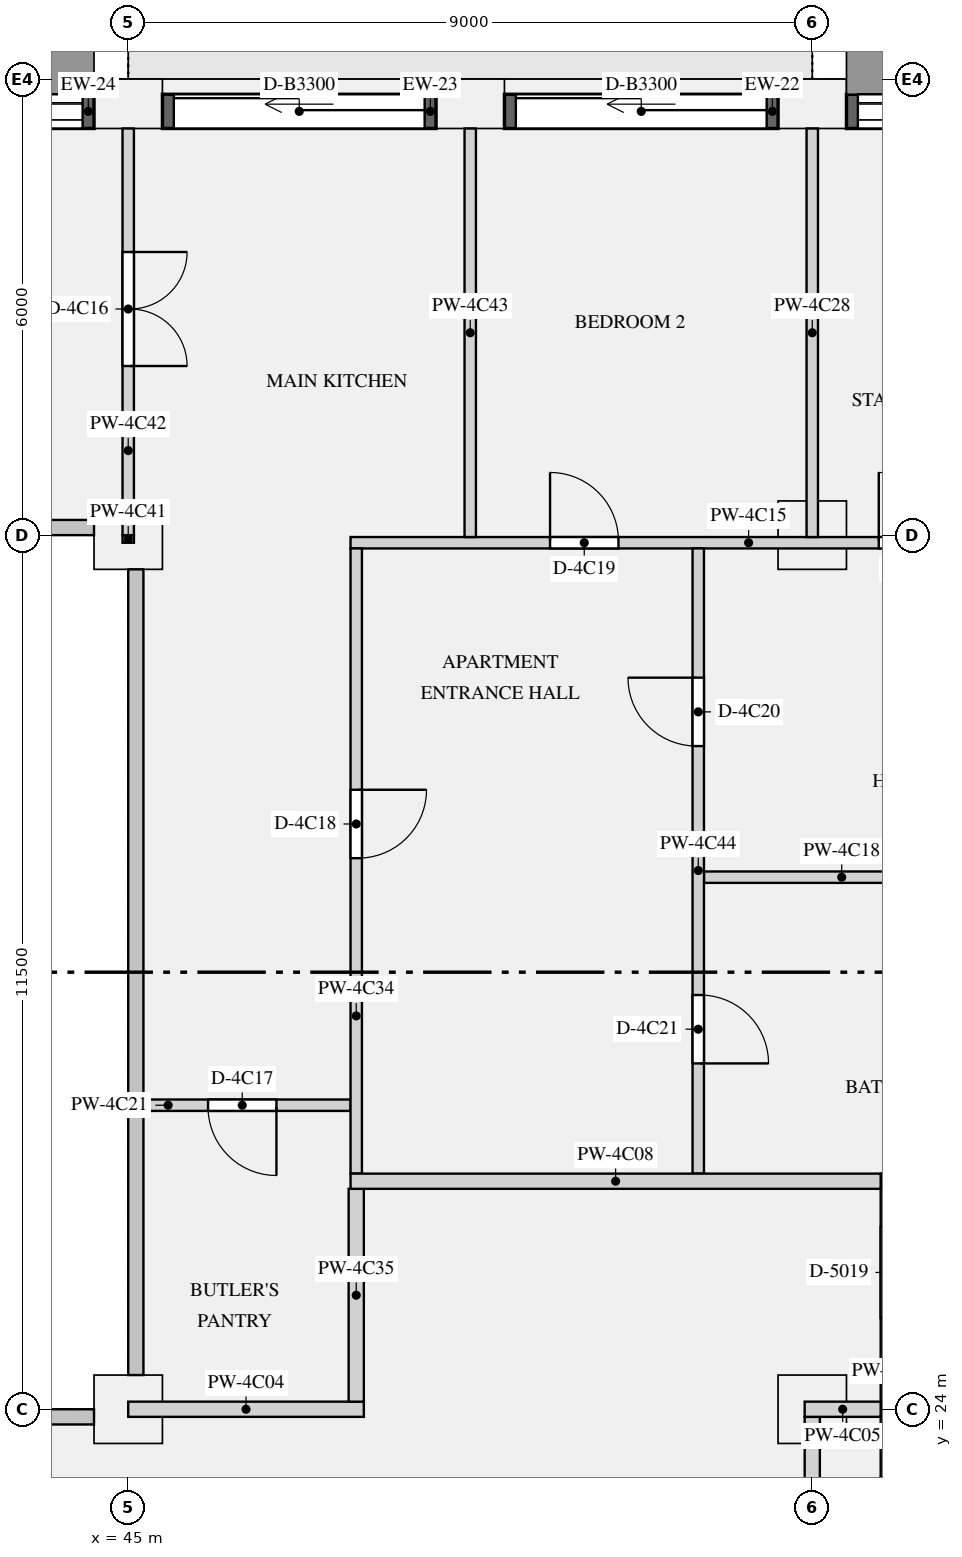
"""IFC4 building model, lengths in metres.
Left out: names, types, materials, properties, quantities, classifications, styles, units other than length and angle.
Written with IfcOpenShell. Run it as: python <this file> out.ifc"""

import sys

from ifc_helpers import new_model, si_unit, direction, frame, frame_2d, origin, origin_2d, place, context, subcontext, project, spatial, rectangle, extrude, element, fill, save


model = new_model("IFC4")
c1 = context("Model", 3, precision=1e-05, world=origin(), true_north=direction((0.0, 1.0)))
c2 = subcontext(c1, "Body", "Model", "MODEL_VIEW")
j1 = project(units=[si_unit("LENGTHUNIT", "METRE"), si_unit("PLANEANGLEUNIT", "RADIAN")], contexts=[c1])
p1 = place(None, origin())
s1 = spatial("IfcSite", under=j1, at=p1, CompositionType="ELEMENT")
p2 = place(p1, origin())
s2 = spatial("IfcBuilding", under=s1, at=p2, CompositionType="ELEMENT")
p3 = place(p2, frame((0.0, 0.0, 216.9)))
s3 = spatial("IfcBuildingStorey", under=s2, at=p3, CompositionType="ELEMENT", Elevation=216.9)
for number, where, z_axis, x_axis in (
    (1, (54.0, 41.175, 0.0), (0.0, 0.0, 1.0), (-1.0, 0.0, 0.0)),
    (2, (49.5, 41.175, 0.0), (0.0, 0.0, 1.0), (-1.0, 0.0, 0.0)),
    (3, (45.0, 41.175, 0.0), (0.0, 0.0, 1.0), (-1.0, 0.0, 0.0)),
):
    element("IfcColumn", number, at=place(p3, frame(where, z_axis=z_axis, x_axis=x_axis)), inside=s3, PredefinedType="USERDEFINED", context=c2, shape_type="SweptSolid", body=[
        extrude(rectangle(XDim=0.9, YDim=0.65, at=origin_2d()), origin(), (0.0, 0.0, 1.0), 3.15),
    ])
for number, where, z_axis, x_axis in (
    (4, (45.0, 24.0, 0.0), (0.0, 0.0, 1.0), (1.0, 0.0, 0.0)),
    (5, (54.0, 24.0, 0.0), (0.0, 0.0, 1.0), (1.0, 0.0, 0.0)),
    (6, (45.0, 35.5, 0.0), (0.0, 0.0, 1.0), (1.0, 0.0, 0.0)),
    (7, (54.0, 35.5, 0.0), (0.0, 0.0, 1.0), (1.0, 0.0, 0.0)),
):
    element("IfcColumn", number, at=place(p3, frame(where, z_axis=z_axis, x_axis=x_axis)), inside=s3, PredefinedType="COLUMN", context=c2, shape_type="SweptSolid", body=[
        extrude(rectangle(XDim=0.9, YDim=0.9, at=origin_2d()), origin(), (0.0, 0.0, 1.0), 3.15),
    ])
p4 = place(p3, frame((58.05, 41.075, 0.9), z_axis=(0.0, 0.0, 1.0), x_axis=(-1.0, 0.0, 0.0)))
e8 = element("IfcWall", 8, at=p4, inside=s3, PredefinedType="SOLIDWALL", context=c2, shape_type="SweptSolid", body=[
    extrude(rectangle(XDim=3.6, YDim=0.45, at=frame_2d((1.8, 0.0))), origin(), (0.0, 0.0, 1.0), 1.93),
])
p5 = place(p4, frame((0.15, 0.0, 0.15)))
e9 = element("IfcOpeningElement", 9, at=p5, cuts=e8, PredefinedType="OPENING", context=c2, shape_type="SweptSolid", body=[
    extrude(rectangle(XDim=3.3, YDim=1.5, at=frame_2d((1.65, 0.75))), frame((0.0, 0.235, 0.0), z_axis=(0.0, -1.0, 0.0), x_axis=(1.0, 0.0, 0.0)), (0.0, 0.0, 1.0), 0.47),
])
p6 = place(p3, frame((53.55, 41.075, 0.0), z_axis=(0.0, 0.0, 1.0), x_axis=(-1.0, 0.0, 0.0)))
e10 = element("IfcWall", 10, at=p6, inside=s3, PredefinedType="SOLIDWALL", context=c2, shape_type="SweptSolid", body=[
    extrude(rectangle(XDim=3.6, YDim=0.45, at=frame_2d((1.8, 0.0))), origin(), (0.0, 0.0, 1.0), 2.83),
])
p7 = place(p6, frame((0.15, 0.0, 0.0)))
e11 = element("IfcOpeningElement", 11, at=p7, cuts=e10, PredefinedType="OPENING", context=c2, shape_type="SweptSolid", body=[
    extrude(rectangle(XDim=3.3, YDim=2.3, at=frame_2d((1.65, 1.15))), frame((0.0, 0.235, 0.0), z_axis=(0.0, -1.0, 0.0), x_axis=(1.0, 0.0, 0.0)), (0.0, 0.0, 1.0), 0.47),
])
p8 = place(p3, frame((49.05, 41.075, 0.0), z_axis=(0.0, 0.0, 1.0), x_axis=(-1.0, 0.0, 0.0)))
e12 = element("IfcWall", 12, at=p8, inside=s3, PredefinedType="SOLIDWALL", context=c2, shape_type="SweptSolid", body=[
    extrude(rectangle(XDim=3.6, YDim=0.45, at=frame_2d((1.8, 0.0))), origin(), (0.0, 0.0, 1.0), 2.83),
])
p9 = place(p8, frame((0.15, 0.0, 0.0)))
e13 = element("IfcOpeningElement", 13, at=p9, cuts=e12, PredefinedType="OPENING", context=c2, shape_type="SweptSolid", body=[
    extrude(rectangle(XDim=3.3, YDim=2.3, at=frame_2d((1.65, 1.15))), frame((0.0, 0.235, 0.0), z_axis=(0.0, -1.0, 0.0), x_axis=(1.0, 0.0, 0.0)), (0.0, 0.0, 1.0), 0.47),
])
p10 = place(p3, frame((44.55, 41.075, 0.9), z_axis=(0.0, 0.0, 1.0), x_axis=(-1.0, 0.0, 0.0)))
e14 = element("IfcWall", 14, at=p10, inside=s3, PredefinedType="SOLIDWALL", context=c2, shape_type="SweptSolid", body=[
    extrude(rectangle(XDim=3.6, YDim=0.45, at=frame_2d((1.8, 0.0))), origin(), (0.0, 0.0, 1.0), 1.93),
])
p11 = place(p10, frame((0.15, 0.0, 0.15)))
e15 = element("IfcOpeningElement", 15, at=p11, cuts=e14, PredefinedType="OPENING", context=c2, shape_type="SweptSolid", body=[
    extrude(rectangle(XDim=3.3, YDim=1.5, at=frame_2d((1.65, 0.75))), frame((0.0, 0.235, 0.0), z_axis=(0.0, -1.0, 0.0), x_axis=(1.0, 0.0, 0.0)), (0.0, 0.0, 1.0), 0.47),
])
p12 = place(p3, frame((54.9, 27.0, 0.0), z_axis=(0.0, 0.0, 1.0), x_axis=(1.0, 0.0, 0.0)))
e16 = element("IfcWall", 16, at=p12, inside=s3, PredefinedType="PARTITIONING", context=c2, shape_type="SweptSolid", body=[
    extrude(rectangle(XDim=1.3, YDim=0.2, at=frame_2d((0.65, 0.0))), origin(), (0.0, 0.0, 1.0), 2.83),
])
p13 = place(p3, frame((55.0, 23.1, 0.0), z_axis=(0.0, 0.0, 1.0), x_axis=(0.0, 1.0, 0.0)))
e17 = element("IfcWall", 17, at=p13, inside=s3, PredefinedType="PARTITIONING", context=c2, shape_type="SweptSolid", body=[
    extrude(rectangle(XDim=3.8, YDim=0.2, at=frame_2d((1.9, 0.0))), origin(), (0.0, 0.0, 1.0), 2.83),
])
p14 = place(p13, frame((2.1, 0.0, 0.0)))
e18 = element("IfcOpeningElement", 18, at=p14, cuts=e17, PredefinedType="OPENING", context=c2, shape_type="SweptSolid", body=[
    extrude(rectangle(XDim=1.2, YDim=2.1, at=frame_2d((0.6, 1.05))), frame((0.0, 0.11, 0.0), z_axis=(0.0, -1.0, 0.0), x_axis=(1.0, 0.0, 0.0)), (0.0, 0.0, 1.0), 0.22),
])
p15 = place(p3, frame((45.0, 24.0, 0.0), z_axis=(0.0, 0.0, 1.0), x_axis=(1.0, 0.0, 0.0)))
e19 = element("IfcWall", 19, at=p15, inside=s3, PredefinedType="PARTITIONING", context=c2, shape_type="SweptSolid", body=[
    extrude(rectangle(XDim=3.1, YDim=0.2, at=frame_2d((1.55, 0.0))), origin(), (0.0, 0.0, 1.0), 2.83),
])
p16 = place(p3, frame((53.9, 24.0, 0.0), z_axis=(0.0, 0.0, 1.0), x_axis=(1.0, 0.0, 0.0)))
e20 = element("IfcWall", 20, at=p16, inside=s3, PredefinedType="PARTITIONING", context=c2, shape_type="SweptSolid", body=[
    extrude(rectangle(XDim=1.0, YDim=0.2, at=frame_2d((0.5, 0.0))), origin(), (0.0, 0.0, 1.0), 2.83),
])
p17 = place(p3, frame((47.925, 27.0, 0.0), z_axis=(0.0, 0.0, 1.0), x_axis=(1.0, 0.0, 0.0)))
e21 = element("IfcWall", 21, at=p17, inside=s3, PredefinedType="PARTITIONING", context=c2, shape_type="SweptSolid", body=[
    extrude(rectangle(XDim=6.975, YDim=0.2, at=frame_2d((3.487, 0.0))), origin(), (0.0, 0.0, 1.0), 2.83),
])
p18 = place(p3, frame((47.925, 35.4, 0.0), z_axis=(0.0, 0.0, 1.0), x_axis=(1.0, 0.0, 0.0)))
e22 = element("IfcWall", 22, at=p18, inside=s3, PredefinedType="PARTITIONING", context=c2, shape_type="SweptSolid", body=[
    extrude(rectangle(XDim=8.275, YDim=0.15, at=frame_2d((4.137, 0.0))), origin(), (0.0, 0.0, 1.0), 2.83),
])
p19 = place(p18, frame((2.625, 0.0, 0.0)))
e23 = element("IfcOpeningElement", 23, at=p19, cuts=e22, PredefinedType="OPENING", context=c2, shape_type="SweptSolid", body=[
    extrude(rectangle(XDim=0.9, YDim=2.1, at=frame_2d((0.45, 1.05))), frame((0.0, 0.085, 0.0), z_axis=(0.0, -1.0, 0.0), x_axis=(1.0, 0.0, 0.0)), (0.0, 0.0, 1.0), 0.17),
])
p20 = place(p18, frame((6.95, 0.0, 0.0)))
e24 = element("IfcOpeningElement", 24, at=p20, cuts=e22, PredefinedType="OPENING", context=c2, shape_type="SweptSolid", body=[
    extrude(rectangle(XDim=0.9, YDim=2.1, at=frame_2d((0.45, 1.05))), frame((0.0, 0.085, 0.0), z_axis=(0.0, -1.0, 0.0), x_axis=(1.0, 0.0, 0.0)), (0.0, 0.0, 1.0), 0.17),
])
p21 = place(p3, frame((52.575, 31.0, 0.0), z_axis=(0.0, 0.0, 1.0), x_axis=(1.0, 0.0, 0.0)))
e25 = element("IfcWall", 25, at=p21, inside=s3, PredefinedType="PARTITIONING", context=c2, shape_type="SweptSolid", body=[
    extrude(rectangle(XDim=3.625, YDim=0.15, at=frame_2d((1.812, 0.0))), origin(), (0.0, 0.0, 1.0), 2.83),
])
p22 = place(p3, frame((45.0, 28.0, 0.0), z_axis=(0.0, 0.0, 1.0), x_axis=(1.0, 0.0, 0.0)))
e26 = element("IfcWall", 26, at=p22, inside=s3, PredefinedType="PARTITIONING", context=c2, shape_type="SweptSolid", body=[
    extrude(rectangle(XDim=2.925, YDim=0.15, at=frame_2d((1.462, 0.0))), origin(), (0.0, 0.0, 1.0), 2.83),
])
p23 = place(p22, frame((1.05, 0.0, 0.0)))
e27 = element("IfcOpeningElement", 27, at=p23, cuts=e26, PredefinedType="OPENING", context=c2, shape_type="SweptSolid", body=[
    extrude(rectangle(XDim=0.9, YDim=2.1, at=frame_2d((0.45, 1.05))), frame((0.0, 0.085, 0.0), z_axis=(0.0, -1.0, 0.0), x_axis=(1.0, 0.0, 0.0)), (0.0, 0.0, 1.0), 0.17),
])
p24 = place(p3, frame((54.0, 35.475, 0.0), z_axis=(0.0, 0.0, 1.0), x_axis=(0.0, 1.0, 0.0)))
e28 = element("IfcWall", 28, at=p24, inside=s3, PredefinedType="PARTITIONING", context=c2, shape_type="SweptSolid", body=[
    extrude(rectangle(XDim=5.375, YDim=0.15, at=frame_2d((2.688, 0.0))), origin(), (0.0, 0.0, 1.0), 2.83),
])
p25 = place(p3, frame((54.0, 16.1, 0.0), z_axis=(0.0, 0.0, 1.0), x_axis=(0.0, 1.0, 0.0)))
e29 = element("IfcWall", 29, at=p25, inside=s3, PredefinedType="PARTITIONING", context=c2, shape_type="SweptSolid", body=[
    extrude(rectangle(XDim=7.8, YDim=0.2, at=frame_2d((3.9, 0.0))), origin(), (0.0, 0.0, 1.0), 2.83),
])
p26 = place(p25, frame((1.85, 0.0, 0.0)))
e30 = element("IfcOpeningElement", 30, at=p26, cuts=e29, PredefinedType="OPENING", context=c2, shape_type="SweptSolid", body=[
    extrude(rectangle(XDim=1.1, YDim=2.1, at=frame_2d((0.55, 1.05))), frame((0.0, 0.11, 0.0), z_axis=(0.0, -1.0, 0.0), x_axis=(1.0, 0.0, 0.0)), (0.0, 0.0, 1.0), 0.22),
])
p27 = place(p3, frame((48.0, 27.1, 0.0), z_axis=(0.0, 0.0, 1.0), x_axis=(0.0, 1.0, 0.0)))
e31 = element("IfcWall", 31, at=p27, inside=s3, PredefinedType="PARTITIONING", context=c2, shape_type="SweptSolid", body=[
    extrude(rectangle(XDim=8.225, YDim=0.15, at=frame_2d((4.112, 0.0))), origin(), (0.0, 0.0, 1.0), 2.83),
])
p28 = place(p27, frame((4.15, 0.0, 0.0)))
e32 = element("IfcOpeningElement", 32, at=p28, cuts=e31, PredefinedType="OPENING", context=c2, shape_type="SweptSolid", body=[
    extrude(rectangle(XDim=0.9, YDim=2.1, at=frame_2d((0.45, 1.05))), frame((0.0, 0.085, 0.0), z_axis=(0.0, -1.0, 0.0), x_axis=(1.0, 0.0, 0.0)), (0.0, 0.0, 1.0), 0.17),
])
p29 = place(p3, frame((48.0, 24.1, 0.0), z_axis=(0.0, 0.0, 1.0), x_axis=(0.0, 1.0, 0.0)))
e33 = element("IfcWall", 33, at=p29, inside=s3, PredefinedType="PARTITIONING", context=c2, shape_type="SweptSolid", body=[
    extrude(rectangle(XDim=2.8, YDim=0.2, at=frame_2d((1.4, 0.0))), origin(), (0.0, 0.0, 1.0), 2.83),
])
p30 = place(p3, frame((45.0, 35.4, 0.0), z_axis=(0.0, 0.0, 1.0), x_axis=(0.0, 1.0, 0.0)))
e34 = element("IfcWall", 34, at=p30, inside=s3, PredefinedType="PARTITIONING", context=c2, shape_type="SweptSolid", body=[
    extrude(rectangle(XDim=0.1, YDim=0.15, at=frame_2d((0.05, 0.0))), origin(), (0.0, 0.0, 1.0), 2.83),
])
p31 = place(p3, frame((45.0, 35.5, 0.0), z_axis=(0.0, 0.0, 1.0), x_axis=(0.0, 1.0, 0.0)))
e35 = element("IfcWall", 35, at=p31, inside=s3, PredefinedType="PARTITIONING", context=c2, shape_type="SweptSolid", body=[
    extrude(rectangle(XDim=5.35, YDim=0.15, at=frame_2d((2.675, 0.0))), origin(), (0.0, 0.0, 1.0), 2.83),
])
p32 = place(p31, frame((2.225, 0.0, 0.0)))
e36 = element("IfcOpeningElement", 36, at=p32, cuts=e35, PredefinedType="OPENING", context=c2, shape_type="SweptSolid", body=[
    extrude(rectangle(XDim=1.5, YDim=2.1, at=frame_2d((0.75, 1.05))), frame((0.0, 0.085, 0.0), z_axis=(0.0, -1.0, 0.0), x_axis=(1.0, 0.0, 0.0)), (0.0, 0.0, 1.0), 0.17),
])
p33 = place(p3, frame((49.5, 35.475, 0.0), z_axis=(0.0, 0.0, 1.0), x_axis=(0.0, 1.0, 0.0)))
e37 = element("IfcWall", 37, at=p33, inside=s3, PredefinedType="PARTITIONING", context=c2, shape_type="SweptSolid", body=[
    extrude(rectangle(XDim=5.375, YDim=0.15, at=frame_2d((2.688, 0.0))), origin(), (0.0, 0.0, 1.0), 2.83),
])
p34 = place(p3, frame((52.5, 27.1, 0.0), z_axis=(0.0, 0.0, 1.0), x_axis=(0.0, 1.0, 0.0)))
e38 = element("IfcWall", 38, at=p34, inside=s3, PredefinedType="PARTITIONING", context=c2, shape_type="SweptSolid", body=[
    extrude(rectangle(XDim=8.225, YDim=0.15, at=frame_2d((4.112, 0.0))), origin(), (0.0, 0.0, 1.0), 2.83),
])
p35 = place(p34, frame((5.625, 0.0, 0.0)))
e39 = element("IfcOpeningElement", 39, at=p35, cuts=e38, PredefinedType="OPENING", context=c2, shape_type="SweptSolid", body=[
    extrude(rectangle(XDim=0.9, YDim=2.1, at=frame_2d((0.45, 1.05))), frame((0.0, 0.085, 0.0), z_axis=(0.0, -1.0, 0.0), x_axis=(1.0, 0.0, 0.0)), (0.0, 0.0, 1.0), 0.17),
])
p36 = place(p34, frame((1.45, 0.0, 0.0)))
e40 = element("IfcOpeningElement", 40, at=p36, cuts=e38, PredefinedType="OPENING", context=c2, shape_type="SweptSolid", body=[
    extrude(rectangle(XDim=0.9, YDim=2.1, at=frame_2d((0.45, 1.05))), frame((0.0, 0.085, 0.0), z_axis=(0.0, -1.0, 0.0), x_axis=(1.0, 0.0, 0.0)), (0.0, 0.0, 1.0), 0.17),
])
p37 = place(p5, origin())
e41 = element("IfcWindow", 41, at=p37, inside=s3, PartitioningType="SINGLE_PANEL", PredefinedType="WINDOW", context=c2, shape_type="SweptSolid", body=[
    extrude(rectangle(XDim=3.3, YDim=1.5, at=frame_2d((1.65, 0.75))), frame((0.0, -0.065, 0.0), z_axis=(0.0, -1.0, 0.0), x_axis=(1.0, 0.0, 0.0)), (0.0, 0.0, 1.0), 0.06),
])
fill(e9, e41)
p38 = place(p7, origin())
e42 = element("IfcDoor", 42, at=p38, inside=s3, OperationType="SLIDING_TO_LEFT", PredefinedType="DOOR", context=c2, shape_type="SweptSolid", body=[
    extrude(rectangle(XDim=3.3, YDim=2.3, at=frame_2d((1.65, 1.15))), frame((0.0, -0.07, 0.0), z_axis=(0.0, -1.0, 0.0), x_axis=(1.0, 0.0, 0.0)), (0.0, 0.0, 1.0), 0.05),
])
fill(e11, e42)
p39 = place(p9, origin())
e43 = element("IfcDoor", 43, at=p39, inside=s3, OperationType="SLIDING_TO_LEFT", PredefinedType="DOOR", context=c2, shape_type="SweptSolid", body=[
    extrude(rectangle(XDim=3.3, YDim=2.3, at=frame_2d((1.65, 1.15))), frame((0.0, -0.07, 0.0), z_axis=(0.0, -1.0, 0.0), x_axis=(1.0, 0.0, 0.0)), (0.0, 0.0, 1.0), 0.05),
])
fill(e13, e43)
p40 = place(p11, origin())
e44 = element("IfcWindow", 44, at=p40, inside=s3, PartitioningType="SINGLE_PANEL", PredefinedType="WINDOW", context=c2, shape_type="SweptSolid", body=[
    extrude(rectangle(XDim=3.3, YDim=1.5, at=frame_2d((1.65, 0.75))), frame((0.0, -0.065, 0.0), z_axis=(0.0, -1.0, 0.0), x_axis=(1.0, 0.0, 0.0)), (0.0, 0.0, 1.0), 0.06),
])
fill(e15, e44)
p41 = place(p32, frame((1.5, 0.0, 0.0), z_axis=(0.0, 0.0, 1.0), x_axis=(-1.0, 0.0, 0.0)))
e45 = element("IfcDoor", 45, at=p41, inside=s3, OperationType="DOUBLE_DOOR_SINGLE_SWING", PredefinedType="DOOR", context=c2, shape_type="SweptSolid", body=[
    extrude(rectangle(XDim=1.5, YDim=2.1, at=frame_2d((0.75, 1.05))), frame((0.0, 0.025, 0.0), z_axis=(0.0, -1.0, 0.0), x_axis=(1.0, 0.0, 0.0)), (0.0, 0.0, 1.0), 0.05),
])
fill(e36, e45)
p42 = place(p23, frame((0.9, 0.0, 0.0), z_axis=(0.0, 0.0, 1.0), x_axis=(-1.0, 0.0, 0.0)))
e46 = element("IfcDoor", 46, at=p42, inside=s3, OperationType="SINGLE_SWING_LEFT", PredefinedType="DOOR", context=c2, shape_type="SweptSolid", body=[
    extrude(rectangle(XDim=0.9, YDim=2.1, at=frame_2d((0.45, 1.05))), frame((0.0, 0.025, 0.0), z_axis=(0.0, -1.0, 0.0), x_axis=(1.0, 0.0, 0.0)), (0.0, 0.0, 1.0), 0.05),
])
fill(e27, e46)
p43 = place(p28, frame((0.9, 0.0, 0.0), z_axis=(0.0, 0.0, 1.0), x_axis=(-1.0, 0.0, 0.0)))
e47 = element("IfcDoor", 47, at=p43, inside=s3, OperationType="SINGLE_SWING_LEFT", PredefinedType="DOOR", context=c2, shape_type="SweptSolid", body=[
    extrude(rectangle(XDim=0.9, YDim=2.1, at=frame_2d((0.45, 1.05))), frame((0.0, 0.025, 0.0), z_axis=(0.0, -1.0, 0.0), x_axis=(1.0, 0.0, 0.0)), (0.0, 0.0, 1.0), 0.05),
])
fill(e32, e47)
p44 = place(p19, origin())
e48 = element("IfcDoor", 48, at=p44, inside=s3, OperationType="SINGLE_SWING_LEFT", PredefinedType="DOOR", context=c2, shape_type="SweptSolid", body=[
    extrude(rectangle(XDim=0.9, YDim=2.1, at=frame_2d((0.45, 1.05))), frame((0.0, 0.025, 0.0), z_axis=(0.0, -1.0, 0.0), x_axis=(1.0, 0.0, 0.0)), (0.0, 0.0, 1.0), 0.05),
])
fill(e23, e48)
p45 = place(p35, origin())
e49 = element("IfcDoor", 49, at=p45, inside=s3, OperationType="SINGLE_SWING_RIGHT", PredefinedType="DOOR", context=c2, shape_type="SweptSolid", body=[
    extrude(rectangle(XDim=0.9, YDim=2.1, at=frame_2d((0.45, 1.05))), frame((0.0, 0.025, 0.0), z_axis=(0.0, -1.0, 0.0), x_axis=(1.0, 0.0, 0.0)), (0.0, 0.0, 1.0), 0.05),
])
fill(e39, e49)
p46 = place(p36, frame((0.9, 0.0, 0.0), z_axis=(0.0, 0.0, 1.0), x_axis=(-1.0, 0.0, 0.0)))
e50 = element("IfcDoor", 50, at=p46, inside=s3, OperationType="SINGLE_SWING_RIGHT", PredefinedType="DOOR", context=c2, shape_type="SweptSolid", body=[
    extrude(rectangle(XDim=0.9, YDim=2.1, at=frame_2d((0.45, 1.05))), frame((0.0, 0.025, 0.0), z_axis=(0.0, -1.0, 0.0), x_axis=(1.0, 0.0, 0.0)), (0.0, 0.0, 1.0), 0.05),
])
fill(e40, e50)
p47 = place(p20, origin())
e51 = element("IfcDoor", 51, at=p47, inside=s3, OperationType="SINGLE_SWING_LEFT", PredefinedType="DOOR", context=c2, shape_type="SweptSolid", body=[
    extrude(rectangle(XDim=0.9, YDim=2.1, at=frame_2d((0.45, 1.05))), frame((0.0, 0.025, 0.0), z_axis=(0.0, -1.0, 0.0), x_axis=(1.0, 0.0, 0.0)), (0.0, 0.0, 1.0), 0.05),
])
fill(e24, e51)
save(model, sys.argv[1])
